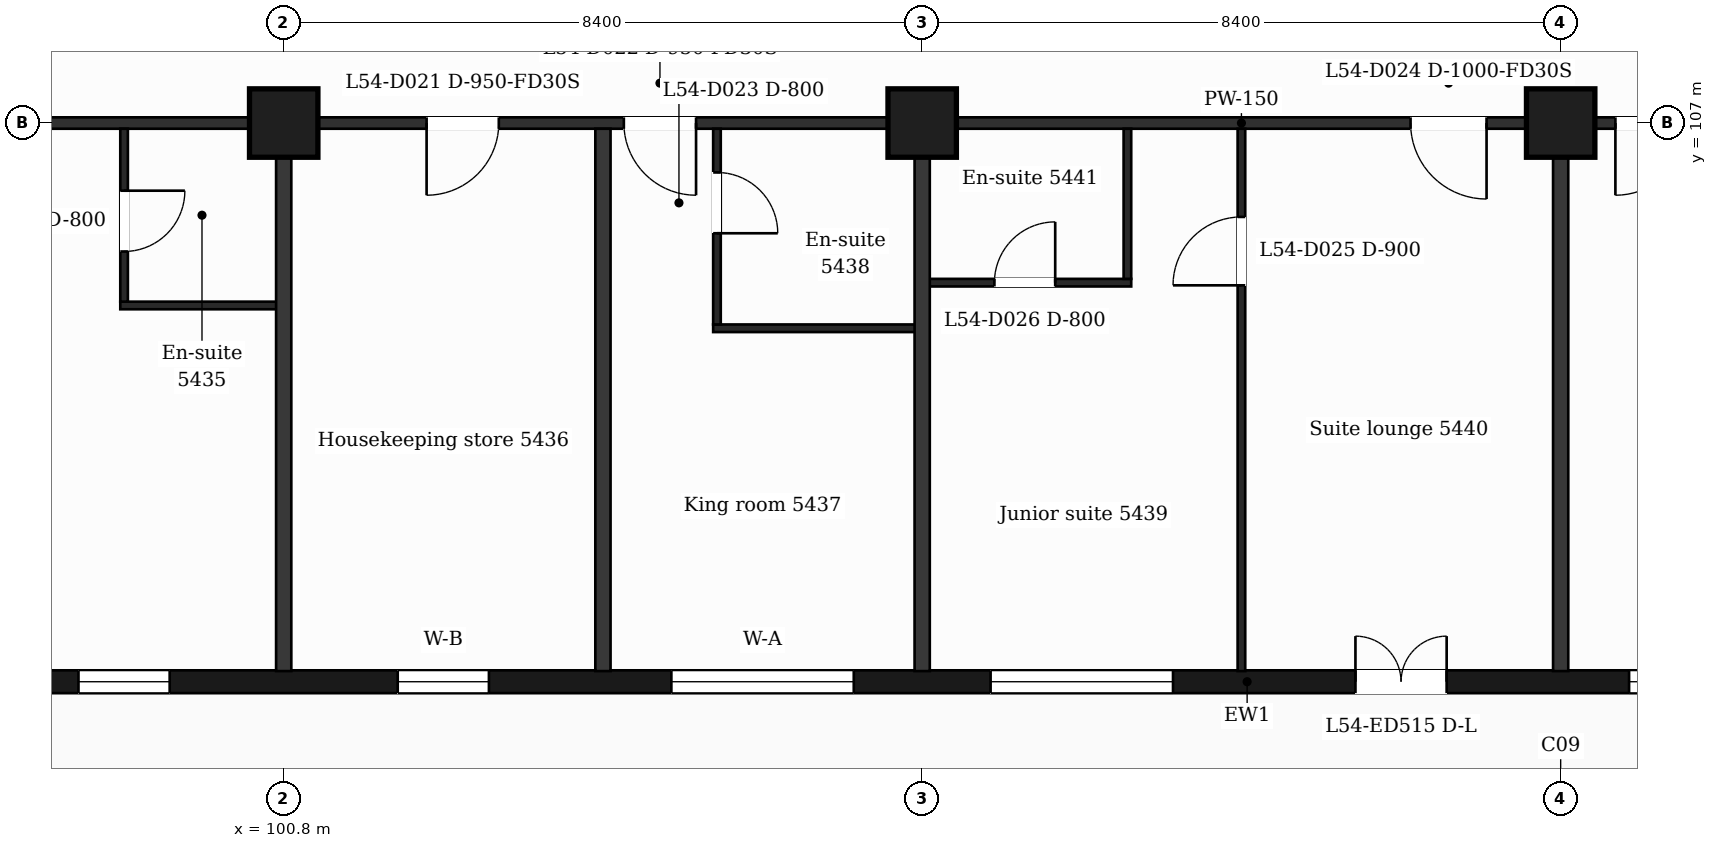
"""IFC4 building model, lengths in metres.
Left out: names, types, materials, properties, quantities, classifications, styles, units other than length and angle.
Written with IfcOpenShell. Run it as: python <this file> out.ifc"""

import sys

from ifc_helpers import new_model, si_unit, direction, frame, frame_2d, origin, origin_2d, place, context, subcontext, project, spatial, rectangle, extrude, element, fill, save


model = new_model("IFC4")
c1 = context("Model", 3, precision=1e-05, world=origin(), true_north=direction((0.0, 1.0)))
c2 = subcontext(c1, "Body", "Model", "MODEL_VIEW")
j1 = project(units=[si_unit("LENGTHUNIT", "METRE"), si_unit("PLANEANGLEUNIT", "RADIAN")], contexts=[c1])
p1 = place(None, origin())
s1 = spatial("IfcSite", under=j1, at=p1, CompositionType="ELEMENT")
p2 = place(p1, origin())
s2 = spatial("IfcBuilding", under=s1, at=p2, CompositionType="ELEMENT")
p3 = place(p2, frame((0.0, 0.0, 224.4)))
s3 = spatial("IfcBuildingStorey", under=s2, at=p3, CompositionType="ELEMENT", Elevation=224.4)
for number, where, z_axis, x_axis in (
    (1, (100.8, 107.0, 0.0), (0.0, 0.0, 1.0), (1.0, 0.0, 0.0)),
    (2, (109.2, 107.0, 0.0), (0.0, 0.0, 1.0), (1.0, 0.0, 0.0)),
    (3, (117.6, 107.0, 0.0), (0.0, 0.0, 1.0), (1.0, 0.0, 0.0)),
):
    element("IfcColumn", number, at=place(p3, frame(where, z_axis=z_axis, x_axis=x_axis)), inside=s3, PredefinedType="COLUMN", context=c2, shape_type="SweptSolid", body=[
        extrude(rectangle(XDim=0.9, YDim=0.9, at=origin_2d()), origin(), (0.0, 0.0, 1.0), 3.7),
    ])
p4 = place(p3, frame((89.85, 99.65, 0.0), z_axis=(0.0, 0.0, 1.0), x_axis=(1.0, 0.0, 0.0)))
e4 = element("IfcWall", 4, at=p4, inside=s3, PredefinedType="SOLIDWALL", context=c2, shape_type="SweptSolid", body=[
    extrude(rectangle(XDim=47.25, YDim=0.3, at=frame_2d((23.625, 0.0))), origin(), (0.0, 0.0, 1.0), 3.38),
])
p5 = place(p4, frame((0.725, 0.0, 0.9)))
e5 = element("IfcOpeningElement", 5, at=p5, cuts=e4, PredefinedType="OPENING", context=c2, shape_type="SweptSolid", body=[
    extrude(rectangle(XDim=1.2, YDim=2.1, at=frame_2d((0.6, 1.05))), frame((0.0, 0.16, 0.0), z_axis=(0.0, -1.0, 0.0), x_axis=(1.0, 0.0, 0.0)), (0.0, 0.0, 1.0), 0.32),
])
p6 = place(p4, frame((3.45, 0.0, 0.9)))
e6 = element("IfcOpeningElement", 6, at=p6, cuts=e4, PredefinedType="OPENING", context=c2, shape_type="SweptSolid", body=[
    extrude(rectangle(XDim=2.4, YDim=2.1, at=frame_2d((1.2, 1.05))), frame((0.0, 0.16, 0.0), z_axis=(0.0, -1.0, 0.0), x_axis=(1.0, 0.0, 0.0)), (0.0, 0.0, 1.0), 0.32),
])
p7 = place(p4, frame((8.25, 0.0, 0.9)))
e7 = element("IfcOpeningElement", 7, at=p7, cuts=e4, PredefinedType="OPENING", context=c2, shape_type="SweptSolid", body=[
    extrude(rectangle(XDim=1.2, YDim=2.1, at=frame_2d((0.6, 1.05))), frame((0.0, 0.16, 0.0), z_axis=(0.0, -1.0, 0.0), x_axis=(1.0, 0.0, 0.0)), (0.0, 0.0, 1.0), 0.32),
])
p8 = place(p4, frame((12.45, 0.0, 0.9)))
e8 = element("IfcOpeningElement", 8, at=p8, cuts=e4, PredefinedType="OPENING", context=c2, shape_type="SweptSolid", body=[
    extrude(rectangle(XDim=1.2, YDim=2.1, at=frame_2d((0.6, 1.05))), frame((0.0, 0.16, 0.0), z_axis=(0.0, -1.0, 0.0), x_axis=(1.0, 0.0, 0.0)), (0.0, 0.0, 1.0), 0.32),
])
p9 = place(p4, frame((16.05, 0.0, 0.9)))
e9 = element("IfcOpeningElement", 9, at=p9, cuts=e4, PredefinedType="OPENING", context=c2, shape_type="SweptSolid", body=[
    extrude(rectangle(XDim=2.4, YDim=2.1, at=frame_2d((1.2, 1.05))), frame((0.0, 0.16, 0.0), z_axis=(0.0, -1.0, 0.0), x_axis=(1.0, 0.0, 0.0)), (0.0, 0.0, 1.0), 0.32),
])
p10 = place(p4, frame((20.25, 0.0, 0.9)))
e10 = element("IfcOpeningElement", 10, at=p10, cuts=e4, PredefinedType="OPENING", context=c2, shape_type="SweptSolid", body=[
    extrude(rectangle(XDim=2.4, YDim=2.1, at=frame_2d((1.2, 1.05))), frame((0.0, 0.16, 0.0), z_axis=(0.0, -1.0, 0.0), x_axis=(1.0, 0.0, 0.0)), (0.0, 0.0, 1.0), 0.32),
])
p11 = place(p4, frame((25.05, 0.0, 0.0)))
e11 = element("IfcOpeningElement", 11, at=p11, cuts=e4, PredefinedType="OPENING", context=c2, shape_type="SweptSolid", body=[
    extrude(rectangle(XDim=1.2, YDim=2.4, at=frame_2d((0.6, 1.2))), frame((0.0, 0.16, 0.0), z_axis=(0.0, -1.0, 0.0), x_axis=(1.0, 0.0, 0.0)), (0.0, 0.0, 1.0), 0.32),
])
p12 = place(p4, frame((28.65, 0.0, 0.9)))
e12 = element("IfcOpeningElement", 12, at=p12, cuts=e4, PredefinedType="OPENING", context=c2, shape_type="SweptSolid", body=[
    extrude(rectangle(XDim=2.4, YDim=2.1, at=frame_2d((1.2, 1.05))), frame((0.0, 0.16, 0.0), z_axis=(0.0, -1.0, 0.0), x_axis=(1.0, 0.0, 0.0)), (0.0, 0.0, 1.0), 0.32),
])
p13 = place(p4, frame((32.85, 0.0, 0.9)))
e13 = element("IfcOpeningElement", 13, at=p13, cuts=e4, PredefinedType="OPENING", context=c2, shape_type="SweptSolid", body=[
    extrude(rectangle(XDim=2.4, YDim=2.1, at=frame_2d((1.2, 1.05))), frame((0.0, 0.16, 0.0), z_axis=(0.0, -1.0, 0.0), x_axis=(1.0, 0.0, 0.0)), (0.0, 0.0, 1.0), 0.32),
])
p14 = place(p4, frame((37.65, 0.0, 0.9)))
e14 = element("IfcOpeningElement", 14, at=p14, cuts=e4, PredefinedType="OPENING", context=c2, shape_type="SweptSolid", body=[
    extrude(rectangle(XDim=1.2, YDim=2.1, at=frame_2d((0.6, 1.05))), frame((0.0, 0.16, 0.0), z_axis=(0.0, -1.0, 0.0), x_axis=(1.0, 0.0, 0.0)), (0.0, 0.0, 1.0), 0.32),
])
p15 = place(p4, frame((41.85, 0.0, 0.9)))
e15 = element("IfcOpeningElement", 15, at=p15, cuts=e4, PredefinedType="OPENING", context=c2, shape_type="SweptSolid", body=[
    extrude(rectangle(XDim=1.2, YDim=2.1, at=frame_2d((0.6, 1.05))), frame((0.0, 0.16, 0.0), z_axis=(0.0, -1.0, 0.0), x_axis=(1.0, 0.0, 0.0)), (0.0, 0.0, 1.0), 0.32),
])
p16 = place(p4, frame((45.25, 0.0, 0.9)))
e16 = element("IfcOpeningElement", 16, at=p16, cuts=e4, PredefinedType="OPENING", context=c2, shape_type="SweptSolid", body=[
    extrude(rectangle(XDim=1.2, YDim=2.1, at=frame_2d((0.6, 1.05))), frame((0.0, 0.16, 0.0), z_axis=(0.0, -1.0, 0.0), x_axis=(1.0, 0.0, 0.0)), (0.0, 0.0, 1.0), 0.32),
])
p17 = place(p3, frame((106.45, 104.3, 0.0), z_axis=(0.0, 0.0, 1.0), x_axis=(1.0, 0.0, 0.0)))
e17 = element("IfcWall", 17, at=p17, inside=s3, PredefinedType="PARTITIONING", context=c2, shape_type="SweptSolid", body=[
    extrude(rectangle(XDim=2.75, YDim=0.1, at=frame_2d((1.375, 0.0))), origin(), (0.0, 0.0, 1.0), 3.38),
])
p18 = place(p3, frame((98.65, 104.6, 0.0), z_axis=(0.0, 0.0, 1.0), x_axis=(1.0, 0.0, 0.0)))
e18 = element("IfcWall", 18, at=p18, inside=s3, PredefinedType="PARTITIONING", context=c2, shape_type="SweptSolid", body=[
    extrude(rectangle(XDim=2.15, YDim=0.1, at=frame_2d((1.075, 0.0))), origin(), (0.0, 0.0, 1.0), 3.38),
])
p19 = place(p3, frame((109.2, 104.9, 0.0), z_axis=(0.0, 0.0, 1.0), x_axis=(1.0, 0.0, 0.0)))
e19 = element("IfcWall", 19, at=p19, inside=s3, PredefinedType="PARTITIONING", context=c2, shape_type="SweptSolid", body=[
    extrude(rectangle(XDim=2.75, YDim=0.1, at=frame_2d((1.375, 0.0))), origin(), (0.0, 0.0, 1.0), 3.38),
])
p20 = place(p19, frame((0.95, 0.0, 0.0)))
e20 = element("IfcOpeningElement", 20, at=p20, cuts=e19, PredefinedType="OPENING", context=c2, shape_type="SweptSolid", body=[
    extrude(rectangle(XDim=0.8, YDim=2.1, at=frame_2d((0.4, 1.05))), frame((0.0, 0.06, 0.0), z_axis=(0.0, -1.0, 0.0), x_axis=(1.0, 0.0, 0.0)), (0.0, 0.0, 1.0), 0.12),
])
p21 = place(p3, frame((87.018, 107.0, 0.0), z_axis=(0.0, 0.0, 1.0), x_axis=(1.0, 0.0, 0.0)))
e21 = element("IfcWall", 21, at=p21, inside=s3, PredefinedType="PARTITIONING", context=c2, shape_type="SweptSolid", body=[
    extrude(rectangle(XDim=52.765, YDim=0.15, at=frame_2d((26.382, 0.0))), origin(), (0.0, 0.0, 1.0), 3.38),
])
p22 = place(p21, frame((0.707, 0.0, 0.0)))
e22 = element("IfcOpeningElement", 22, at=p22, cuts=e21, PredefinedType="OPENING", context=c2, shape_type="SweptSolid", body=[
    extrude(rectangle(XDim=0.95, YDim=2.1, at=frame_2d((0.475, 1.05))), frame((0.0, 0.085, 0.0), z_axis=(0.0, -1.0, 0.0), x_axis=(1.0, 0.0, 0.0)), (0.0, 0.0, 1.0), 0.17),
])
p23 = place(p21, frame((6.894, 0.0, 0.0)))
e23 = element("IfcOpeningElement", 23, at=p23, cuts=e21, PredefinedType="OPENING", context=c2, shape_type="SweptSolid", body=[
    extrude(rectangle(XDim=0.95, YDim=2.1, at=frame_2d((0.475, 1.05))), frame((0.0, 0.085, 0.0), z_axis=(0.0, -1.0, 0.0), x_axis=(1.0, 0.0, 0.0)), (0.0, 0.0, 1.0), 0.17),
])
p24 = place(p21, frame((15.662, 0.0, 0.0)))
e24 = element("IfcOpeningElement", 24, at=p24, cuts=e21, PredefinedType="OPENING", context=c2, shape_type="SweptSolid", body=[
    extrude(rectangle(XDim=0.95, YDim=2.1, at=frame_2d((0.475, 1.05))), frame((0.0, 0.085, 0.0), z_axis=(0.0, -1.0, 0.0), x_axis=(1.0, 0.0, 0.0)), (0.0, 0.0, 1.0), 0.17),
])
p25 = place(p21, frame((18.257, 0.0, 0.0)))
e25 = element("IfcOpeningElement", 25, at=p25, cuts=e21, PredefinedType="OPENING", context=c2, shape_type="SweptSolid", body=[
    extrude(rectangle(XDim=0.95, YDim=2.1, at=frame_2d((0.475, 1.05))), frame((0.0, 0.085, 0.0), z_axis=(0.0, -1.0, 0.0), x_axis=(1.0, 0.0, 0.0)), (0.0, 0.0, 1.0), 0.17),
])
p26 = place(p21, frame((28.607, 0.0, 0.0)))
e26 = element("IfcOpeningElement", 26, at=p26, cuts=e21, PredefinedType="OPENING", context=c2, shape_type="SweptSolid", body=[
    extrude(rectangle(XDim=1.0, YDim=2.1, at=frame_2d((0.5, 1.05))), frame((0.0, 0.085, 0.0), z_axis=(0.0, -1.0, 0.0), x_axis=(1.0, 0.0, 0.0)), (0.0, 0.0, 1.0), 0.17),
])
p27 = place(p21, frame((31.302, 0.0, 0.0)))
e27 = element("IfcOpeningElement", 27, at=p27, cuts=e21, PredefinedType="OPENING", context=c2, shape_type="SweptSolid", body=[
    extrude(rectangle(XDim=0.95, YDim=2.1, at=frame_2d((0.475, 1.05))), frame((0.0, 0.085, 0.0), z_axis=(0.0, -1.0, 0.0), x_axis=(1.0, 0.0, 0.0)), (0.0, 0.0, 1.0), 0.17),
])
p28 = place(p21, frame((35.057, 0.0, 0.0)))
e28 = element("IfcOpeningElement", 28, at=p28, cuts=e21, PredefinedType="OPENING", context=c2, shape_type="SweptSolid", body=[
    extrude(rectangle(XDim=0.95, YDim=2.1, at=frame_2d((0.475, 1.05))), frame((0.0, 0.085, 0.0), z_axis=(0.0, -1.0, 0.0), x_axis=(1.0, 0.0, 0.0)), (0.0, 0.0, 1.0), 0.17),
])
p29 = place(p21, frame((41.957, 0.0, 0.0)))
e29 = element("IfcOpeningElement", 29, at=p29, cuts=e21, PredefinedType="OPENING", context=c2, shape_type="SweptSolid", body=[
    extrude(rectangle(XDim=0.95, YDim=2.1, at=frame_2d((0.475, 1.05))), frame((0.0, 0.085, 0.0), z_axis=(0.0, -1.0, 0.0), x_axis=(1.0, 0.0, 0.0)), (0.0, 0.0, 1.0), 0.17),
])
p30 = place(p21, frame((45.712, 0.0, 0.0)))
e30 = element("IfcOpeningElement", 30, at=p30, cuts=e21, PredefinedType="OPENING", context=c2, shape_type="SweptSolid", body=[
    extrude(rectangle(XDim=1.0, YDim=2.1, at=frame_2d((0.5, 1.05))), frame((0.0, 0.085, 0.0), z_axis=(0.0, -1.0, 0.0), x_axis=(1.0, 0.0, 0.0)), (0.0, 0.0, 1.0), 0.17),
])
p31 = place(p21, frame((48.974, 0.0, 0.0)))
e31 = element("IfcOpeningElement", 31, at=p31, cuts=e21, PredefinedType="OPENING", context=c2, shape_type="SweptSolid", body=[
    extrude(rectangle(XDim=0.95, YDim=2.1, at=frame_2d((0.475, 1.05))), frame((0.0, 0.085, 0.0), z_axis=(0.0, -1.0, 0.0), x_axis=(1.0, 0.0, 0.0)), (0.0, 0.0, 1.0), 0.17),
])
p32 = place(p3, frame((98.7, 104.65, 0.0), z_axis=(0.0, 0.0, 1.0), x_axis=(0.0, 1.0, 0.0)))
e32 = element("IfcWall", 32, at=p32, inside=s3, PredefinedType="PARTITIONING", context=c2, shape_type="SweptSolid", body=[
    extrude(rectangle(XDim=2.275, YDim=0.1, at=frame_2d((1.138, 0.0))), origin(), (0.0, 0.0, 1.0), 3.38),
])
p33 = place(p32, frame((0.66, 0.0, 0.0)))
e33 = element("IfcOpeningElement", 33, at=p33, cuts=e32, PredefinedType="OPENING", context=c2, shape_type="SweptSolid", body=[
    extrude(rectangle(XDim=0.8, YDim=2.1, at=frame_2d((0.4, 1.05))), frame((0.0, 0.06, 0.0), z_axis=(0.0, -1.0, 0.0), x_axis=(1.0, 0.0, 0.0)), (0.0, 0.0, 1.0), 0.12),
])
for number, where, z_axis, x_axis in (
    (34, (100.8, 99.79, 0.0), (0.0, 0.0, 1.0), (0.0, 1.0, 0.0)),
    (35, (105.0, 99.79, 0.0), (0.0, 0.0, 1.0), (0.0, 1.0, 0.0)),
):
    element("IfcWall", number, at=place(p3, frame(where, z_axis=z_axis, x_axis=x_axis)), inside=s3, PredefinedType="PARTITIONING", context=c2, shape_type="SweptSolid", body=[
        extrude(rectangle(XDim=7.135, YDim=0.2, at=frame_2d((3.567, 0.0))), origin(), (0.0, 0.0, 1.0), 3.38),
    ])
p34 = place(p3, frame((106.5, 104.35, 0.0), z_axis=(0.0, 0.0, 1.0), x_axis=(0.0, 1.0, 0.0)))
e36 = element("IfcWall", 36, at=p34, inside=s3, PredefinedType="PARTITIONING", context=c2, shape_type="SweptSolid", body=[
    extrude(rectangle(XDim=2.575, YDim=0.1, at=frame_2d((1.288, 0.0))), origin(), (0.0, 0.0, 1.0), 3.38),
])
p35 = place(p34, frame((1.2, 0.0, 0.0)))
e37 = element("IfcOpeningElement", 37, at=p35, cuts=e36, PredefinedType="OPENING", context=c2, shape_type="SweptSolid", body=[
    extrude(rectangle(XDim=0.8, YDim=2.1, at=frame_2d((0.4, 1.05))), frame((0.0, 0.06, 0.0), z_axis=(0.0, -1.0, 0.0), x_axis=(1.0, 0.0, 0.0)), (0.0, 0.0, 1.0), 0.12),
])
p36 = place(p3, frame((109.2, 99.79, 0.0), z_axis=(0.0, 0.0, 1.0), x_axis=(0.0, 1.0, 0.0)))
e38 = element("IfcWall", 38, at=p36, inside=s3, PredefinedType="PARTITIONING", context=c2, shape_type="SweptSolid", body=[
    extrude(rectangle(XDim=7.135, YDim=0.2, at=frame_2d((3.567, 0.0))), origin(), (0.0, 0.0, 1.0), 3.38),
])
p37 = place(p3, frame((111.9, 104.95, 0.0), z_axis=(0.0, 0.0, 1.0), x_axis=(0.0, 1.0, 0.0)))
e39 = element("IfcWall", 39, at=p37, inside=s3, PredefinedType="PARTITIONING", context=c2, shape_type="SweptSolid", body=[
    extrude(rectangle(XDim=1.975, YDim=0.1, at=frame_2d((0.988, 0.0))), origin(), (0.0, 0.0, 1.0), 3.38),
])
p38 = place(p3, frame((113.4, 99.79, 0.0), z_axis=(0.0, 0.0, 1.0), x_axis=(0.0, 1.0, 0.0)))
e40 = element("IfcWall", 40, at=p38, inside=s3, PredefinedType="PARTITIONING", context=c2, shape_type="SweptSolid", body=[
    extrude(rectangle(XDim=7.135, YDim=0.1, at=frame_2d((3.567, 0.0))), origin(), (0.0, 0.0, 1.0), 3.38),
])
p39 = place(p38, frame((5.075, 0.0, 0.0)))
e41 = element("IfcOpeningElement", 41, at=p39, cuts=e40, PredefinedType="OPENING", context=c2, shape_type="SweptSolid", body=[
    extrude(rectangle(XDim=0.9, YDim=2.1, at=frame_2d((0.45, 1.05))), frame((0.0, 0.06, 0.0), z_axis=(0.0, -1.0, 0.0), x_axis=(1.0, 0.0, 0.0)), (0.0, 0.0, 1.0), 0.12),
])
p40 = place(p3, frame((117.6, 99.79, 0.0), z_axis=(0.0, 0.0, 1.0), x_axis=(0.0, 1.0, 0.0)))
e42 = element("IfcWall", 42, at=p40, inside=s3, PredefinedType="PARTITIONING", context=c2, shape_type="SweptSolid", body=[
    extrude(rectangle(XDim=7.135, YDim=0.2, at=frame_2d((3.567, 0.0))), origin(), (0.0, 0.0, 1.0), 3.38),
])
p41 = place(p7, origin())
e43 = element("IfcWindow", 43, at=p41, inside=s3, PartitioningType="SINGLE_PANEL", PredefinedType="WINDOW", context=c2, shape_type="SweptSolid", body=[
    extrude(rectangle(XDim=1.2, YDim=2.1, at=frame_2d((0.6, 1.05))), frame((0.0, 0.03, 0.0), z_axis=(0.0, -1.0, 0.0), x_axis=(1.0, 0.0, 0.0)), (0.0, 0.0, 1.0), 0.06),
])
fill(e7, e43)
p42 = place(p8, origin())
e44 = element("IfcWindow", 44, at=p42, inside=s3, PartitioningType="SINGLE_PANEL", PredefinedType="WINDOW", context=c2, shape_type="SweptSolid", body=[
    extrude(rectangle(XDim=1.2, YDim=2.1, at=frame_2d((0.6, 1.05))), frame((0.0, 0.03, 0.0), z_axis=(0.0, -1.0, 0.0), x_axis=(1.0, 0.0, 0.0)), (0.0, 0.0, 1.0), 0.06),
])
fill(e8, e44)
p43 = place(p9, origin())
e45 = element("IfcWindow", 45, at=p43, inside=s3, PartitioningType="SINGLE_PANEL", PredefinedType="WINDOW", context=c2, shape_type="SweptSolid", body=[
    extrude(rectangle(XDim=2.4, YDim=2.1, at=frame_2d((1.2, 1.05))), frame((0.0, 0.03, 0.0), z_axis=(0.0, -1.0, 0.0), x_axis=(1.0, 0.0, 0.0)), (0.0, 0.0, 1.0), 0.06),
])
fill(e9, e45)
p44 = place(p10, origin())
e46 = element("IfcWindow", 46, at=p44, inside=s3, PartitioningType="SINGLE_PANEL", PredefinedType="WINDOW", context=c2, shape_type="SweptSolid", body=[
    extrude(rectangle(XDim=2.4, YDim=2.1, at=frame_2d((1.2, 1.05))), frame((0.0, 0.03, 0.0), z_axis=(0.0, -1.0, 0.0), x_axis=(1.0, 0.0, 0.0)), (0.0, 0.0, 1.0), 0.06),
])
fill(e10, e46)
p45 = place(p11, origin())
e47 = element("IfcDoor", 47, at=p45, inside=s3, OperationType="DOUBLE_DOOR_SINGLE_SWING", PredefinedType="DOOR", context=c2, shape_type="SweptSolid", body=[
    extrude(rectangle(XDim=1.2, YDim=2.4, at=frame_2d((0.6, 1.2))), frame((0.0, 0.025, 0.0), z_axis=(0.0, -1.0, 0.0), x_axis=(1.0, 0.0, 0.0)), (0.0, 0.0, 1.0), 0.05),
])
fill(e11, e47)
p46 = place(p12, origin())
e48 = element("IfcWindow", 48, at=p46, inside=s3, PartitioningType="SINGLE_PANEL", PredefinedType="WINDOW", context=c2, shape_type="SweptSolid", body=[
    extrude(rectangle(XDim=2.4, YDim=2.1, at=frame_2d((1.2, 1.05))), frame((0.0, 0.03, 0.0), z_axis=(0.0, -1.0, 0.0), x_axis=(1.0, 0.0, 0.0)), (0.0, 0.0, 1.0), 0.06),
])
fill(e12, e48)
p47 = place(p33, origin())
e49 = element("IfcDoor", 49, at=p47, inside=s3, OperationType="SINGLE_SWING_RIGHT", PredefinedType="DOOR", context=c2, shape_type="SweptSolid", body=[
    extrude(rectangle(XDim=0.8, YDim=2.1, at=frame_2d((0.4, 1.05))), frame((0.0, 0.025, 0.0), z_axis=(0.0, -1.0, 0.0), x_axis=(1.0, 0.0, 0.0)), (0.0, 0.0, 1.0), 0.05),
])
fill(e33, e49)
p48 = place(p24, origin())
e50 = element("IfcDoor", 50, at=p48, inside=s3, OperationType="SINGLE_SWING_LEFT", PredefinedType="DOOR", context=c2, shape_type="SweptSolid", body=[
    extrude(rectangle(XDim=0.95, YDim=2.1, at=frame_2d((0.475, 1.05))), frame((0.0, 0.025, 0.0), z_axis=(0.0, -1.0, 0.0), x_axis=(1.0, 0.0, 0.0)), (0.0, 0.0, 1.0), 0.05),
])
fill(e24, e50)
p49 = place(p25, origin())
e51 = element("IfcDoor", 51, at=p49, inside=s3, OperationType="SINGLE_SWING_RIGHT", PredefinedType="DOOR", context=c2, shape_type="SweptSolid", body=[
    extrude(rectangle(XDim=0.95, YDim=2.1, at=frame_2d((0.475, 1.05))), frame((0.0, 0.025, 0.0), z_axis=(0.0, -1.0, 0.0), x_axis=(1.0, 0.0, 0.0)), (0.0, 0.0, 1.0), 0.05),
])
fill(e25, e51)
p50 = place(p35, origin())
e52 = element("IfcDoor", 52, at=p50, inside=s3, OperationType="SINGLE_SWING_LEFT", PredefinedType="DOOR", context=c2, shape_type="SweptSolid", body=[
    extrude(rectangle(XDim=0.8, YDim=2.1, at=frame_2d((0.4, 1.05))), frame((0.0, 0.025, 0.0), z_axis=(0.0, -1.0, 0.0), x_axis=(1.0, 0.0, 0.0)), (0.0, 0.0, 1.0), 0.05),
])
fill(e37, e52)
p51 = place(p26, origin())
e53 = element("IfcDoor", 53, at=p51, inside=s3, OperationType="SINGLE_SWING_RIGHT", PredefinedType="DOOR", context=c2, shape_type="SweptSolid", body=[
    extrude(rectangle(XDim=1.0, YDim=2.1, at=frame_2d((0.5, 1.05))), frame((0.0, 0.025, 0.0), z_axis=(0.0, -1.0, 0.0), x_axis=(1.0, 0.0, 0.0)), (0.0, 0.0, 1.0), 0.05),
])
fill(e26, e53)
p52 = place(p39, origin())
e54 = element("IfcDoor", 54, at=p52, inside=s3, OperationType="SINGLE_SWING_LEFT", PredefinedType="DOOR", context=c2, shape_type="SweptSolid", body=[
    extrude(rectangle(XDim=0.9, YDim=2.1, at=frame_2d((0.45, 1.05))), frame((0.0, 0.025, 0.0), z_axis=(0.0, -1.0, 0.0), x_axis=(1.0, 0.0, 0.0)), (0.0, 0.0, 1.0), 0.05),
])
fill(e41, e54)
p53 = place(p20, origin())
e55 = element("IfcDoor", 55, at=p53, inside=s3, OperationType="SINGLE_SWING_RIGHT", PredefinedType="DOOR", context=c2, shape_type="SweptSolid", body=[
    extrude(rectangle(XDim=0.8, YDim=2.1, at=frame_2d((0.4, 1.05))), frame((0.0, 0.025, 0.0), z_axis=(0.0, -1.0, 0.0), x_axis=(1.0, 0.0, 0.0)), (0.0, 0.0, 1.0), 0.05),
])
fill(e20, e55)
p54 = place(p27, origin())
e56 = element("IfcDoor", 56, at=p54, inside=s3, OperationType="SINGLE_SWING_LEFT", PredefinedType="DOOR", context=c2, shape_type="SweptSolid", body=[
    extrude(rectangle(XDim=0.95, YDim=2.1, at=frame_2d((0.475, 1.05))), frame((0.0, 0.025, 0.0), z_axis=(0.0, -1.0, 0.0), x_axis=(1.0, 0.0, 0.0)), (0.0, 0.0, 1.0), 0.05),
])
fill(e27, e56)
save(model, sys.argv[1])
